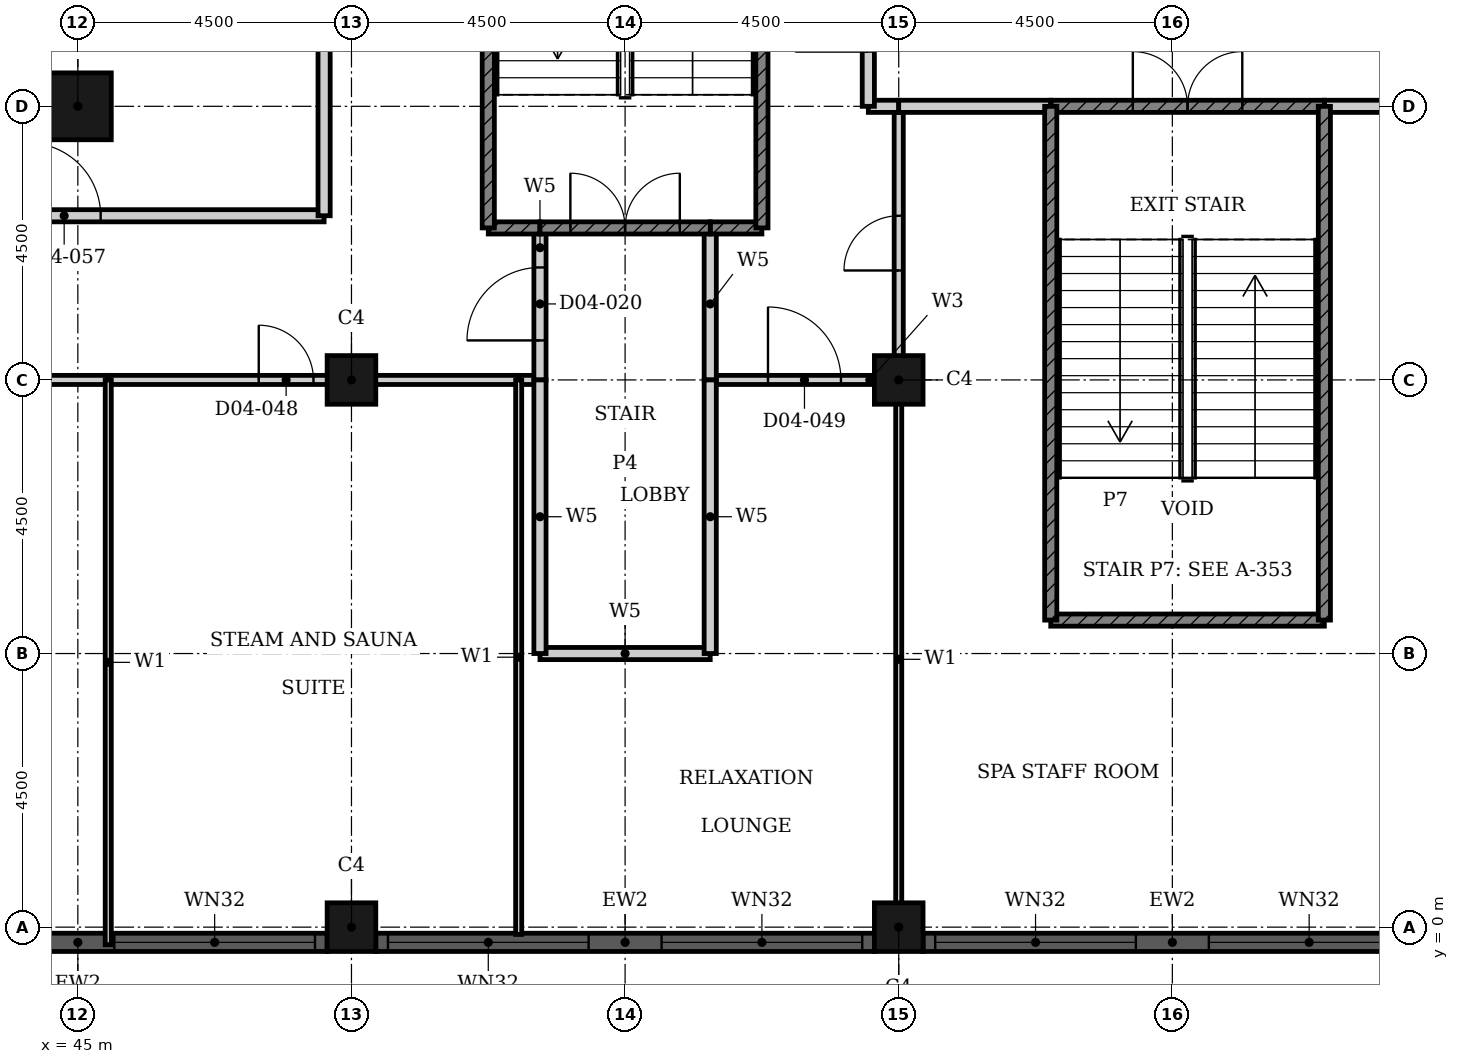
"""IFC4 building model, lengths in metres.
Left out: names, types, materials, properties, quantities, classifications, styles, units other than length and angle.
Written with IfcOpenShell. Run it as: python <this file> out.ifc"""

import sys

from ifc_helpers import new_model, si_unit, direction, frame, frame_2d, origin, origin_2d, place, context, subcontext, project, spatial, rectangle, hollow_rectangle, extrude, element, fill, save


model = new_model("IFC4")
c1 = context("Model", 3, precision=1e-05, world=origin(), true_north=direction((0.0, 1.0)))
c2 = subcontext(c1, "Body", "Model", "MODEL_VIEW")
j1 = project(units=[si_unit("LENGTHUNIT", "METRE"), si_unit("PLANEANGLEUNIT", "RADIAN")], contexts=[c1])
p1 = place(None, origin())
s1 = spatial("IfcSite", under=j1, at=p1, CompositionType="ELEMENT")
p2 = place(p1, origin())
s2 = spatial("IfcBuilding", under=s1, at=p2, CompositionType="ELEMENT")
p3 = place(p2, frame((0.0, 0.0, 24.0)))
s3 = spatial("IfcBuildingStorey", under=s2, at=p3, CompositionType="ELEMENT", Elevation=24.0)
p4 = place(p3, frame((45.0, 13.5, 0.0), z_axis=(0.0, 0.0, 1.0), x_axis=(1.0, 0.0, 0.0)))
e1 = element("IfcColumn", 1, at=p4, inside=s3, PredefinedType="COLUMN", context=c2, shape_type="SweptSolid", body=[
    extrude(hollow_rectangle(XDim=1.1, YDim=1.1, WallThickness=0.036, at=origin_2d()), origin(), (0.0, 0.0, 1.0), 4.8),
])
for number, where, z_axis, x_axis in (
    (2, (49.5, 0.0, 0.0), (0.0, 0.0, 1.0), (1.0, 0.0, 0.0)),
    (3, (58.5, 0.0, 0.0), (0.0, 0.0, 1.0), (1.0, 0.0, 0.0)),
    (4, (49.5, 9.0, 0.0), (0.0, 0.0, 1.0), (1.0, 0.0, 0.0)),
    (5, (58.5, 9.0, 0.0), (0.0, 0.0, 1.0), (1.0, 0.0, 0.0)),
):
    element("IfcColumn", number, at=place(p3, frame(where, z_axis=z_axis, x_axis=x_axis)), inside=s3, PredefinedType="COLUMN", context=c2, shape_type="SweptSolid", body=[
        extrude(hollow_rectangle(XDim=0.8, YDim=0.8, WallThickness=0.025, at=origin_2d()), origin(), (0.0, 0.0, 1.0), 4.8),
    ])
p5 = place(p3, frame((40.9, -0.25, 0.0), z_axis=(0.0, 0.0, 1.0), x_axis=(1.0, 0.0, 0.0)))
e6 = element("IfcWall", 6, at=p5, inside=s3, PredefinedType="SOLIDWALL", context=c2, shape_type="SweptSolid", body=[
    extrude(rectangle(XDim=8.2, YDim=0.3, at=frame_2d((4.1, 0.0))), origin(), (0.0, 0.0, 1.0), 4.8),
])
p6 = place(p5, frame((0.2, 0.0, 0.9)))
e7 = element("IfcOpeningElement", 7, at=p6, cuts=e6, PredefinedType="OPENING", context=c2, shape_type="SweptSolid", body=[
    extrude(rectangle(XDim=3.3, YDim=2.9, at=frame_2d((1.65, 1.45))), frame((0.0, 0.16, 0.0), z_axis=(0.0, -1.0, 0.0), x_axis=(1.0, 0.0, 0.0)), (0.0, 0.0, 1.0), 0.32),
])
p7 = place(p5, frame((4.7, 0.0, 0.9)))
e8 = element("IfcOpeningElement", 8, at=p7, cuts=e6, PredefinedType="OPENING", context=c2, shape_type="SweptSolid", body=[
    extrude(rectangle(XDim=3.3, YDim=2.9, at=frame_2d((1.65, 1.45))), frame((0.0, 0.16, 0.0), z_axis=(0.0, -1.0, 0.0), x_axis=(1.0, 0.0, 0.0)), (0.0, 0.0, 1.0), 0.32),
])
p8 = place(p3, frame((49.9, -0.25, 0.0), z_axis=(0.0, 0.0, 1.0), x_axis=(1.0, 0.0, 0.0)))
e9 = element("IfcWall", 9, at=p8, inside=s3, PredefinedType="SOLIDWALL", context=c2, shape_type="SweptSolid", body=[
    extrude(rectangle(XDim=8.2, YDim=0.3, at=frame_2d((4.1, 0.0))), origin(), (0.0, 0.0, 1.0), 4.8),
])
p9 = place(p8, frame((0.2, 0.0, 0.9)))
e10 = element("IfcOpeningElement", 10, at=p9, cuts=e9, PredefinedType="OPENING", context=c2, shape_type="SweptSolid", body=[
    extrude(rectangle(XDim=3.3, YDim=2.9, at=frame_2d((1.65, 1.45))), frame((0.0, 0.16, 0.0), z_axis=(0.0, -1.0, 0.0), x_axis=(1.0, 0.0, 0.0)), (0.0, 0.0, 1.0), 0.32),
])
p10 = place(p8, frame((4.7, 0.0, 0.9)))
e11 = element("IfcOpeningElement", 11, at=p10, cuts=e9, PredefinedType="OPENING", context=c2, shape_type="SweptSolid", body=[
    extrude(rectangle(XDim=3.3, YDim=2.9, at=frame_2d((1.65, 1.45))), frame((0.0, 0.16, 0.0), z_axis=(0.0, -1.0, 0.0), x_axis=(1.0, 0.0, 0.0)), (0.0, 0.0, 1.0), 0.32),
])
p11 = place(p3, frame((58.9, -0.25, 0.0), z_axis=(0.0, 0.0, 1.0), x_axis=(1.0, 0.0, 0.0)))
e12 = element("IfcWall", 12, at=p11, inside=s3, PredefinedType="SOLIDWALL", context=c2, shape_type="SweptSolid", body=[
    extrude(rectangle(XDim=8.2, YDim=0.3, at=frame_2d((4.1, 0.0))), origin(), (0.0, 0.0, 1.0), 4.8),
])
p12 = place(p11, frame((0.2, 0.0, 0.9)))
e13 = element("IfcOpeningElement", 13, at=p12, cuts=e12, PredefinedType="OPENING", context=c2, shape_type="SweptSolid", body=[
    extrude(rectangle(XDim=3.3, YDim=2.9, at=frame_2d((1.65, 1.45))), frame((0.0, 0.16, 0.0), z_axis=(0.0, -1.0, 0.0), x_axis=(1.0, 0.0, 0.0)), (0.0, 0.0, 1.0), 0.32),
])
p13 = place(p11, frame((4.7, 0.0, 0.9)))
e14 = element("IfcOpeningElement", 14, at=p13, cuts=e12, PredefinedType="OPENING", context=c2, shape_type="SweptSolid", body=[
    extrude(rectangle(XDim=3.3, YDim=2.9, at=frame_2d((1.65, 1.45))), frame((0.0, 0.16, 0.0), z_axis=(0.0, -1.0, 0.0), x_axis=(1.0, 0.0, 0.0)), (0.0, 0.0, 1.0), 0.32),
])
p14 = place(p3, frame((38.75, 9.0, 0.0), z_axis=(0.0, 0.0, 1.0), x_axis=(1.0, 0.0, 0.0)))
e15 = element("IfcWall", 15, at=p14, inside=s3, PredefinedType="PARTITIONING", context=c2, shape_type="SweptSolid", body=[
    extrude(rectangle(XDim=6.75, YDim=0.15, at=frame_2d((3.375, 0.0))), origin(), (0.0, 0.0, 1.0), 4.45),
])
p15 = place(p14, frame((2.925, 0.0, 0.0)))
e16 = element("IfcOpeningElement", 16, at=p15, cuts=e15, PredefinedType="OPENING", context=c2, shape_type="SweptSolid", body=[
    extrude(rectangle(XDim=0.9, YDim=2.1, at=frame_2d((0.45, 1.05))), frame((0.0, 0.085, 0.0), z_axis=(0.0, -1.0, 0.0), x_axis=(1.0, 0.0, 0.0)), (0.0, 0.0, 1.0), 0.17),
])
p16 = place(p3, frame((45.5, 9.0, 0.0), z_axis=(0.0, 0.0, 1.0), x_axis=(1.0, 0.0, 0.0)))
e17 = element("IfcWall", 17, at=p16, inside=s3, PredefinedType="PARTITIONING", context=c2, shape_type="SweptSolid", body=[
    extrude(rectangle(XDim=6.75, YDim=0.15, at=frame_2d((3.375, 0.0))), origin(), (0.0, 0.0, 1.0), 4.45),
])
p17 = place(p16, frame((2.475, 0.0, 0.0)))
e18 = element("IfcOpeningElement", 18, at=p17, cuts=e17, PredefinedType="OPENING", context=c2, shape_type="SweptSolid", body=[
    extrude(rectangle(XDim=0.9, YDim=2.1, at=frame_2d((0.45, 1.05))), frame((0.0, 0.085, 0.0), z_axis=(0.0, -1.0, 0.0), x_axis=(1.0, 0.0, 0.0)), (0.0, 0.0, 1.0), 0.17),
])
p18 = place(p3, frame((52.25, 9.0, 0.0), z_axis=(0.0, 0.0, 1.0), x_axis=(1.0, 0.0, 0.0)))
e19 = element("IfcWall", 19, at=p18, inside=s3, PredefinedType="PARTITIONING", context=c2, shape_type="SweptSolid", body=[
    extrude(rectangle(XDim=0.35, YDim=0.15, at=frame_2d((0.175, 0.0))), origin(), (0.0, 0.0, 1.0), 4.45),
])
p19 = place(p3, frame((55.4, 9.0, 0.0), z_axis=(0.0, 0.0, 1.0), x_axis=(1.0, 0.0, 0.0)))
e20 = element("IfcWall", 20, at=p19, inside=s3, PredefinedType="PARTITIONING", context=c2, shape_type="SweptSolid", body=[
    extrude(rectangle(XDim=3.1, YDim=0.15, at=frame_2d((1.55, 0.0))), origin(), (0.0, 0.0, 1.0), 4.45),
])
p20 = place(p19, frame((0.95, 0.0, 0.0)))
e21 = element("IfcOpeningElement", 21, at=p20, cuts=e20, PredefinedType="OPENING", context=c2, shape_type="SweptSolid", body=[
    extrude(rectangle(XDim=1.2, YDim=2.4, at=frame_2d((0.6, 1.2))), frame((0.0, 0.085, 0.0), z_axis=(0.0, -1.0, 0.0), x_axis=(1.0, 0.0, 0.0)), (0.0, 0.0, 1.0), 0.17),
])
p21 = place(p3, frame((58.5, 9.0, 0.0), z_axis=(0.0, 0.0, 1.0), x_axis=(0.0, 1.0, 0.0)))
e22 = element("IfcWall", 22, at=p21, inside=s3, PredefinedType="PARTITIONING", context=c2, shape_type="SweptSolid", body=[
    extrude(rectangle(XDim=4.5, YDim=0.15, at=frame_2d((2.25, 0.0))), origin(), (0.0, 0.0, 1.0), 4.45),
])
p22 = place(p21, frame((1.8, 0.0, 0.0)))
e23 = element("IfcOpeningElement", 23, at=p22, cuts=e22, PredefinedType="OPENING", context=c2, shape_type="SweptSolid", body=[
    extrude(rectangle(XDim=0.9, YDim=2.1, at=frame_2d((0.45, 1.05))), frame((0.0, 0.085, 0.0), z_axis=(0.0, -1.0, 0.0), x_axis=(1.0, 0.0, 0.0)), (0.0, 0.0, 1.0), 0.17),
])
p23 = place(p3, frame((45.5, -0.29, 0.0), z_axis=(0.0, 0.0, 1.0), x_axis=(0.0, 1.0, 0.0)))
e24 = element("IfcWall", 24, at=p23, inside=s3, PredefinedType="PARTITIONING", context=c2, shape_type="SweptSolid", body=[
    extrude(rectangle(XDim=9.29, YDim=0.1, at=frame_2d((4.645, 0.0))), origin(), (0.0, 0.0, 1.0), 4.45),
])
p24 = place(p3, frame((52.25, -0.12, 0.0), z_axis=(0.0, 0.0, 1.0), x_axis=(0.0, 1.0, 0.0)))
e25 = element("IfcWall", 25, at=p24, inside=s3, PredefinedType="PARTITIONING", context=c2, shape_type="SweptSolid", body=[
    extrude(rectangle(XDim=9.12, YDim=0.1, at=frame_2d((4.56, 0.0))), origin(), (0.0, 0.0, 1.0), 4.45),
])
p25 = place(p3, frame((58.5, -0.19, 0.0), z_axis=(0.0, 0.0, 1.0), x_axis=(0.0, 1.0, 0.0)))
e26 = element("IfcWall", 26, at=p25, inside=s3, PredefinedType="PARTITIONING", context=c2, shape_type="SweptSolid", body=[
    extrude(rectangle(XDim=9.19, YDim=0.1, at=frame_2d((4.595, 0.0))), origin(), (0.0, 0.0, 1.0), 4.45),
])
p26 = place(p3, frame((40.5, 11.7, 0.0), z_axis=(0.0, 0.0, 1.0), x_axis=(1.0, 0.0, 0.0)))
e27 = element("IfcWall", 27, at=p26, inside=s3, PredefinedType="PARTITIONING", context=c2, shape_type="SweptSolid", body=[
    extrude(rectangle(XDim=8.55, YDim=0.2, at=frame_2d((4.275, 0.0))), origin(), (0.0, 0.0, 1.0), 4.45),
])
p27 = place(p26, frame((3.675, 0.0, 0.0)))
e28 = element("IfcOpeningElement", 28, at=p27, cuts=e27, PredefinedType="OPENING", context=c2, shape_type="SweptSolid", body=[
    extrude(rectangle(XDim=1.2, YDim=2.1, at=frame_2d((0.6, 1.05))), frame((0.0, 0.11, 0.0), z_axis=(0.0, -1.0, 0.0), x_axis=(1.0, 0.0, 0.0)), (0.0, 0.0, 1.0), 0.22),
])
p28 = place(p3, frame((58.0, 13.5, 0.0), z_axis=(0.0, 0.0, 1.0), x_axis=(1.0, 0.0, 0.0)))
e29 = element("IfcWall", 29, at=p28, inside=s3, PredefinedType="PARTITIONING", context=c2, shape_type="SweptSolid", body=[
    extrude(rectangle(XDim=0.5, YDim=0.2, at=frame_2d((0.25, 0.0))), origin(), (0.0, 0.0, 1.0), 4.45),
])
p29 = place(p3, frame((58.5, 13.5, 0.0), z_axis=(0.0, 0.0, 1.0), x_axis=(1.0, 0.0, 0.0)))
e30 = element("IfcWall", 30, at=p29, inside=s3, PredefinedType="PARTITIONING", context=c2, shape_type="SweptSolid", body=[
    extrude(rectangle(XDim=2.5, YDim=0.2, at=frame_2d((1.25, 0.0))), origin(), (0.0, 0.0, 1.0), 4.45),
])
p30 = place(p3, frame((65.5, 13.5, 0.0), z_axis=(0.0, 0.0, 1.0), x_axis=(1.0, 0.0, 0.0)))
e31 = element("IfcWall", 31, at=p30, inside=s3, PredefinedType="PARTITIONING", context=c2, shape_type="SweptSolid", body=[
    extrude(rectangle(XDim=2.29, YDim=0.2, at=frame_2d((1.145, 0.0))), origin(), (0.0, 0.0, 1.0), 4.45),
])
p31 = place(p3, frame((52.6, 4.5, 0.0), z_axis=(0.0, 0.0, 1.0), x_axis=(1.0, 0.0, 0.0)))
e32 = element("IfcWall", 32, at=p31, inside=s3, PredefinedType="PARTITIONING", context=c2, shape_type="SweptSolid", body=[
    extrude(rectangle(XDim=2.8, YDim=0.2, at=frame_2d((1.4, 0.0))), origin(), (0.0, 0.0, 1.0), 4.45),
])
p32 = place(p3, frame((49.05, 11.7, 0.0), z_axis=(0.0, 0.0, 1.0), x_axis=(0.0, 1.0, 0.0)))
e33 = element("IfcWall", 33, at=p32, inside=s3, PredefinedType="PARTITIONING", context=c2, shape_type="SweptSolid", body=[
    extrude(rectangle(XDim=8.2, YDim=0.2, at=frame_2d((4.1, 0.0))), origin(), (0.0, 0.0, 1.0), 4.45),
])
p33 = place(p3, frame((52.6, 9.0, 0.0), z_axis=(0.0, 0.0, 1.0), x_axis=(0.0, 1.0, 0.0)))
e34 = element("IfcWall", 34, at=p33, inside=s3, PredefinedType="PARTITIONING", context=c2, shape_type="SweptSolid", body=[
    extrude(rectangle(XDim=2.5, YDim=0.2, at=frame_2d((1.25, 0.0))), origin(), (0.0, 0.0, 1.0), 4.45),
])
p34 = place(p33, frame((0.65, 0.0, 0.0)))
e35 = element("IfcOpeningElement", 35, at=p34, cuts=e34, PredefinedType="OPENING", context=c2, shape_type="SweptSolid", body=[
    extrude(rectangle(XDim=1.2, YDim=2.1, at=frame_2d((0.6, 1.05))), frame((0.0, 0.11, 0.0), z_axis=(0.0, -1.0, 0.0), x_axis=(1.0, 0.0, 0.0)), (0.0, 0.0, 1.0), 0.22),
])
p35 = place(p3, frame((52.6, 4.5, 0.0), z_axis=(0.0, 0.0, 1.0), x_axis=(0.0, 1.0, 0.0)))
e36 = element("IfcWall", 36, at=p35, inside=s3, PredefinedType="PARTITIONING", context=c2, shape_type="SweptSolid", body=[
    extrude(rectangle(XDim=4.5, YDim=0.2, at=frame_2d((2.25, 0.0))), origin(), (0.0, 0.0, 1.0), 4.45),
])
p36 = place(p3, frame((55.4, 9.0, 0.0), z_axis=(0.0, 0.0, 1.0), x_axis=(0.0, 1.0, 0.0)))
e37 = element("IfcWall", 37, at=p36, inside=s3, PredefinedType="PARTITIONING", context=c2, shape_type="SweptSolid", body=[
    extrude(rectangle(XDim=2.5, YDim=0.2, at=frame_2d((1.25, 0.0))), origin(), (0.0, 0.0, 1.0), 4.45),
])
p37 = place(p3, frame((55.4, 4.5, 0.0), z_axis=(0.0, 0.0, 1.0), x_axis=(0.0, 1.0, 0.0)))
e38 = element("IfcWall", 38, at=p37, inside=s3, PredefinedType="PARTITIONING", context=c2, shape_type="SweptSolid", body=[
    extrude(rectangle(XDim=4.5, YDim=0.2, at=frame_2d((2.25, 0.0))), origin(), (0.0, 0.0, 1.0), 4.45),
])
p38 = place(p3, frame((58.0, 13.5, 0.0), z_axis=(0.0, 0.0, 1.0), x_axis=(0.0, 1.0, 0.0)))
e39 = element("IfcWall", 39, at=p38, inside=s3, PredefinedType="PARTITIONING", context=c2, shape_type="SweptSolid", body=[
    extrude(rectangle(XDim=3.0, YDim=0.2, at=frame_2d((1.5, 0.0))), origin(), (0.0, 0.0, 1.0), 4.45),
])
p39 = place(p38, frame((0.9, 0.0, 0.0)))
e40 = element("IfcOpeningElement", 40, at=p39, cuts=e39, PredefinedType="OPENING", context=c2, shape_type="SweptSolid", body=[
    extrude(rectangle(XDim=1.2, YDim=2.1, at=frame_2d((0.6, 1.05))), frame((0.0, 0.11, 0.0), z_axis=(0.0, -1.0, 0.0), x_axis=(1.0, 0.0, 0.0)), (0.0, 0.0, 1.0), 0.22),
])
for number, where, z_axis, x_axis in (
    (41, (51.75, 11.5, 0.0), (0.0, 0.0, 1.0), (1.0, 0.0, 0.0)),
    (42, (55.4, 11.5, 0.0), (0.0, 0.0, 1.0), (1.0, 0.0, 0.0)),
):
    element("IfcWall", number, at=place(p3, frame(where, z_axis=z_axis, x_axis=x_axis)), inside=s3, PredefinedType="SHEAR", context=c2, shape_type="SweptSolid", body=[
        extrude(rectangle(XDim=0.85, YDim=0.2, at=frame_2d((0.425, 0.0))), origin(), (0.0, 0.0, 1.0), 4.45),
    ])
p40 = place(p3, frame((52.6, 11.5, 0.0), z_axis=(0.0, 0.0, 1.0), x_axis=(1.0, 0.0, 0.0)))
e43 = element("IfcWall", 43, at=p40, inside=s3, PredefinedType="SHEAR", context=c2, shape_type="SweptSolid", body=[
    extrude(rectangle(XDim=2.8, YDim=0.2, at=frame_2d((1.4, 0.0))), origin(), (0.0, 0.0, 1.0), 4.45),
])
p41 = place(p40, frame((0.5, 0.0, 0.0)))
e44 = element("IfcOpeningElement", 44, at=p41, cuts=e43, PredefinedType="OPENING", context=c2, shape_type="SweptSolid", body=[
    extrude(rectangle(XDim=1.8, YDim=2.1, at=frame_2d((0.9, 1.05))), frame((0.0, 0.11, 0.0), z_axis=(0.0, -1.0, 0.0), x_axis=(1.0, 0.0, 0.0)), (0.0, 0.0, 1.0), 0.22),
])
p42 = place(p3, frame((61.0, 13.5, 0.0), z_axis=(0.0, 0.0, 1.0), x_axis=(1.0, 0.0, 0.0)))
e45 = element("IfcWall", 45, at=p42, inside=s3, PredefinedType="SHEAR", context=c2, shape_type="SweptSolid", body=[
    extrude(rectangle(XDim=4.5, YDim=0.2, at=frame_2d((2.25, 0.0))), origin(), (0.0, 0.0, 1.0), 4.45),
])
p43 = place(p42, frame((1.35, 0.0, 0.0)))
e46 = element("IfcOpeningElement", 46, at=p43, cuts=e45, PredefinedType="OPENING", context=c2, shape_type="SweptSolid", body=[
    extrude(rectangle(XDim=1.8, YDim=2.1, at=frame_2d((0.9, 1.05))), frame((0.0, 0.11, 0.0), z_axis=(0.0, -1.0, 0.0), x_axis=(1.0, 0.0, 0.0)), (0.0, 0.0, 1.0), 0.22),
])
p44 = place(p3, frame((61.0, 5.05, 0.0), z_axis=(0.0, 0.0, 1.0), x_axis=(1.0, 0.0, 0.0)))
e47 = element("IfcWall", 47, at=p44, inside=s3, PredefinedType="SHEAR", context=c2, shape_type="SweptSolid", body=[
    extrude(rectangle(XDim=4.5, YDim=0.2, at=frame_2d((2.25, 0.0))), origin(), (0.0, 0.0, 1.0), 4.45),
])
for number, where, z_axis, x_axis in (
    (48, (51.75, 11.5, 0.0), (0.0, 0.0, 1.0), (0.0, 1.0, 0.0)),
    (49, (56.25, 11.5, 0.0), (0.0, 0.0, 1.0), (0.0, 1.0, 0.0)),
    (50, (61.0, 5.05, 0.0), (0.0, 0.0, 1.0), (0.0, 1.0, 0.0)),
    (51, (65.5, 5.05, 0.0), (0.0, 0.0, 1.0), (0.0, 1.0, 0.0)),
):
    element("IfcWall", number, at=place(p3, frame(where, z_axis=z_axis, x_axis=x_axis)), inside=s3, PredefinedType="SHEAR", context=c2, shape_type="SweptSolid", body=[
        extrude(rectangle(XDim=8.45, YDim=0.2, at=frame_2d((4.225, 0.0))), origin(), (0.0, 0.0, 1.0), 4.45),
    ])
p45 = place(p7, origin())
e52 = element("IfcWindow", 52, at=p45, inside=s3, PartitioningType="SINGLE_PANEL", PredefinedType="WINDOW", context=c2, shape_type="SweptSolid", body=[
    extrude(rectangle(XDim=3.3, YDim=2.9, at=frame_2d((1.65, 1.45))), frame((0.0, 0.03, 0.0), z_axis=(0.0, -1.0, 0.0), x_axis=(1.0, 0.0, 0.0)), (0.0, 0.0, 1.0), 0.06),
])
fill(e8, e52)
p46 = place(p9, origin())
e53 = element("IfcWindow", 53, at=p46, inside=s3, PartitioningType="SINGLE_PANEL", PredefinedType="WINDOW", context=c2, shape_type="SweptSolid", body=[
    extrude(rectangle(XDim=3.3, YDim=2.9, at=frame_2d((1.65, 1.45))), frame((0.0, 0.03, 0.0), z_axis=(0.0, -1.0, 0.0), x_axis=(1.0, 0.0, 0.0)), (0.0, 0.0, 1.0), 0.06),
])
fill(e10, e53)
p47 = place(p10, origin())
e54 = element("IfcWindow", 54, at=p47, inside=s3, PartitioningType="SINGLE_PANEL", PredefinedType="WINDOW", context=c2, shape_type="SweptSolid", body=[
    extrude(rectangle(XDim=3.3, YDim=2.9, at=frame_2d((1.65, 1.45))), frame((0.0, 0.03, 0.0), z_axis=(0.0, -1.0, 0.0), x_axis=(1.0, 0.0, 0.0)), (0.0, 0.0, 1.0), 0.06),
])
fill(e11, e54)
p48 = place(p12, origin())
e55 = element("IfcWindow", 55, at=p48, inside=s3, PartitioningType="SINGLE_PANEL", PredefinedType="WINDOW", context=c2, shape_type="SweptSolid", body=[
    extrude(rectangle(XDim=3.3, YDim=2.9, at=frame_2d((1.65, 1.45))), frame((0.0, 0.03, 0.0), z_axis=(0.0, -1.0, 0.0), x_axis=(1.0, 0.0, 0.0)), (0.0, 0.0, 1.0), 0.06),
])
fill(e13, e55)
p49 = place(p13, origin())
e56 = element("IfcWindow", 56, at=p49, inside=s3, PartitioningType="SINGLE_PANEL", PredefinedType="WINDOW", context=c2, shape_type="SweptSolid", body=[
    extrude(rectangle(XDim=3.3, YDim=2.9, at=frame_2d((1.65, 1.45))), frame((0.0, 0.03, 0.0), z_axis=(0.0, -1.0, 0.0), x_axis=(1.0, 0.0, 0.0)), (0.0, 0.0, 1.0), 0.06),
])
fill(e14, e56)
p50 = place(p34, origin())
e57 = element("IfcDoor", 57, at=p50, inside=s3, OperationType="SINGLE_SWING_RIGHT", PredefinedType="DOOR", context=c2, shape_type="SweptSolid", body=[
    extrude(rectangle(XDim=1.2, YDim=2.1, at=frame_2d((0.6, 1.05))), frame((0.0, 0.025, 0.0), z_axis=(0.0, -1.0, 0.0), x_axis=(1.0, 0.0, 0.0)), (0.0, 0.0, 1.0), 0.05),
])
fill(e35, e57)
p51 = place(p41, origin())
e58 = element("IfcDoor", 58, at=p51, inside=s3, OperationType="DOUBLE_DOOR_SINGLE_SWING", PredefinedType="DOOR", context=c2, shape_type="SweptSolid", body=[
    extrude(rectangle(XDim=1.8, YDim=2.1, at=frame_2d((0.9, 1.05))), frame((0.0, 0.025, 0.0), z_axis=(0.0, -1.0, 0.0), x_axis=(1.0, 0.0, 0.0)), (0.0, 0.0, 1.0), 0.05),
])
fill(e44, e58)
p52 = place(p43, origin())
e59 = element("IfcDoor", 59, at=p52, inside=s3, OperationType="DOUBLE_DOOR_SINGLE_SWING", PredefinedType="DOOR", context=c2, shape_type="SweptSolid", body=[
    extrude(rectangle(XDim=1.8, YDim=2.1, at=frame_2d((0.9, 1.05))), frame((0.0, 0.025, 0.0), z_axis=(0.0, -1.0, 0.0), x_axis=(1.0, 0.0, 0.0)), (0.0, 0.0, 1.0), 0.05),
])
fill(e46, e59)
p53 = place(p22, origin())
e60 = element("IfcDoor", 60, at=p53, inside=s3, OperationType="SINGLE_SWING_LEFT", PredefinedType="DOOR", context=c2, shape_type="SweptSolid", body=[
    extrude(rectangle(XDim=0.9, YDim=2.1, at=frame_2d((0.45, 1.05))), frame((0.0, 0.025, 0.0), z_axis=(0.0, -1.0, 0.0), x_axis=(1.0, 0.0, 0.0)), (0.0, 0.0, 1.0), 0.05),
])
fill(e23, e60)
p54 = place(p17, origin())
e61 = element("IfcDoor", 61, at=p54, inside=s3, OperationType="SINGLE_SWING_LEFT", PredefinedType="DOOR", context=c2, shape_type="SweptSolid", body=[
    extrude(rectangle(XDim=0.9, YDim=2.1, at=frame_2d((0.45, 1.05))), frame((0.0, 0.025, 0.0), z_axis=(0.0, -1.0, 0.0), x_axis=(1.0, 0.0, 0.0)), (0.0, 0.0, 1.0), 0.05),
])
fill(e18, e61)
p55 = place(p20, origin())
e62 = element("IfcDoor", 62, at=p55, inside=s3, OperationType="SINGLE_SWING_LEFT", PredefinedType="DOOR", context=c2, shape_type="SweptSolid", body=[
    extrude(rectangle(XDim=1.2, YDim=2.4, at=frame_2d((0.6, 1.2))), frame((0.0, 0.025, 0.0), z_axis=(0.0, -1.0, 0.0), x_axis=(1.0, 0.0, 0.0)), (0.0, 0.0, 1.0), 0.05),
])
fill(e21, e62)
p56 = place(p27, origin())
e63 = element("IfcDoor", 63, at=p56, inside=s3, OperationType="SINGLE_SWING_RIGHT", PredefinedType="DOOR", context=c2, shape_type="SweptSolid", body=[
    extrude(rectangle(XDim=1.2, YDim=2.1, at=frame_2d((0.6, 1.05))), frame((0.0, 0.025, 0.0), z_axis=(0.0, -1.0, 0.0), x_axis=(1.0, 0.0, 0.0)), (0.0, 0.0, 1.0), 0.05),
])
fill(e28, e63)
save(model, sys.argv[1])
